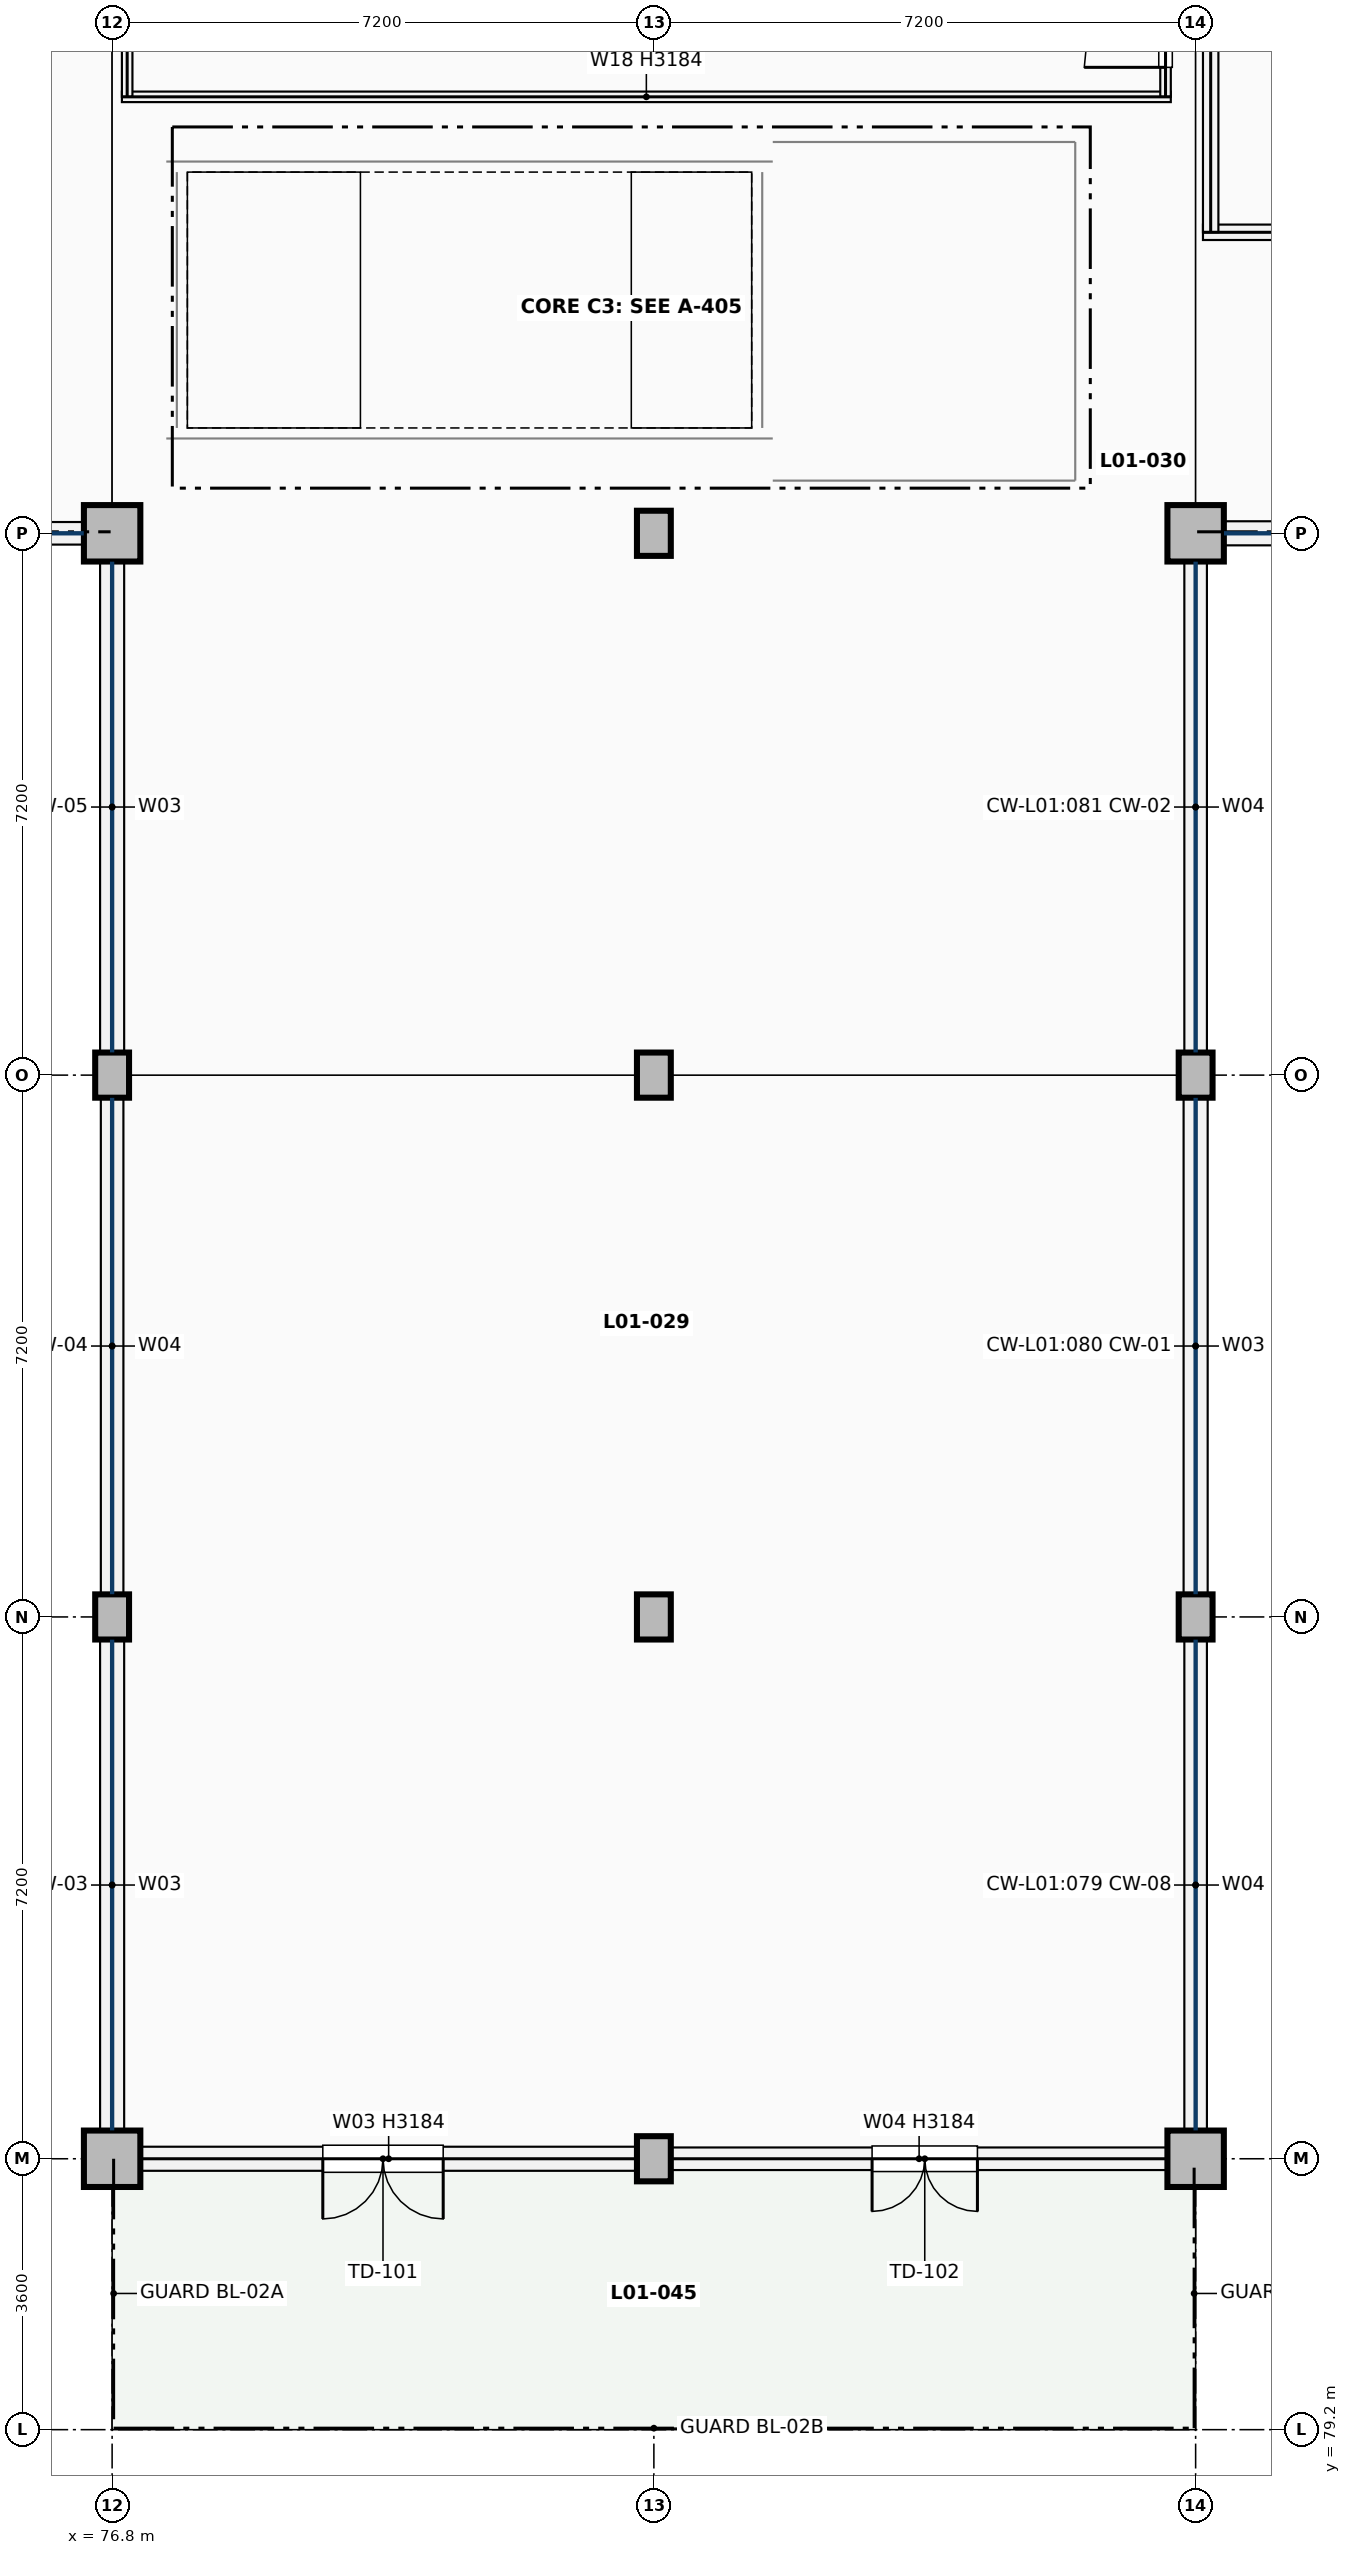
"""IFC4 building model, lengths in metres.
Left out: names, types, materials, properties, quantities, classifications, styles, units other than length and angle.
Written with IfcOpenShell. Run it as: python <this file> out.ifc"""

import sys

from ifc_helpers import new_model, si_unit, direction, frame, frame_2d, origin, origin_2d, place, context, subcontext, project, spatial, rectangle, extrude, element, fill, save


model = new_model("IFC4")
c1 = context("Model", 3, precision=1e-05, world=origin(), true_north=direction((0.0, 1.0)))
c2 = subcontext(c1, "Body", "Model", "MODEL_VIEW")
j1 = project(units=[si_unit("LENGTHUNIT", "METRE"), si_unit("PLANEANGLEUNIT", "RADIAN")], contexts=[c1])
p1 = place(None, origin())
s1 = spatial("IfcSite", under=j1, at=p1, CompositionType="ELEMENT")
p2 = place(p1, origin())
s2 = spatial("IfcBuilding", under=s1, at=p2, CompositionType="ELEMENT")
p3 = place(p2, frame((0.0, 0.0, 5.1)))
s3 = spatial("IfcBuildingStorey", under=s2, at=p3, CompositionType="ELEMENT", Elevation=5.1)
p4 = place(p3, frame((76.8, 82.8, 0.0), z_axis=(0.0, 0.0, 1.0), x_axis=(1.0, 0.0, 0.0)))
e1 = element("IfcColumn", 1, at=p4, inside=s3, PredefinedType="COLUMN", context=c2, shape_type="SweptSolid", body=[
    extrude(rectangle(XDim=0.75, YDim=0.75, at=origin_2d()), origin(), (0.0, 0.0, 1.0), 4.42),
])
for number, where, z_axis, x_axis in (
    (2, (76.8, 90.0, 0.0), (0.0, 0.0, 1.0), (1.0, 0.0, 0.0)),
    (3, (76.8, 97.2, 0.0), (0.0, 0.0, 1.0), (1.0, 0.0, 0.0)),
):
    element("IfcColumn", number, at=place(p3, frame(where, z_axis=z_axis, x_axis=x_axis)), inside=s3, PredefinedType="COLUMN", context=c2, shape_type="SweptSolid", body=[
        extrude(rectangle(XDim=0.45, YDim=0.6, at=origin_2d()), origin(), (0.0, 0.0, 1.0), 4.42),
    ])
p5 = place(p3, frame((76.8, 104.4, 0.0), z_axis=(0.0, 0.0, 1.0), x_axis=(1.0, 0.0, 0.0)))
e4 = element("IfcColumn", 4, at=p5, inside=s3, PredefinedType="COLUMN", context=c2, shape_type="SweptSolid", body=[
    extrude(rectangle(XDim=0.75, YDim=0.75, at=origin_2d()), origin(), (0.0, 0.0, 1.0), 4.42),
])
for number, where, z_axis, x_axis in (
    (5, (84.0, 82.8, 0.0), (0.0, 0.0, 1.0), (1.0, 0.0, 0.0)),
    (6, (84.0, 90.0, 0.0), (0.0, 0.0, 1.0), (1.0, 0.0, 0.0)),
    (7, (84.0, 97.2, 0.0), (0.0, 0.0, 1.0), (1.0, 0.0, 0.0)),
    (8, (84.0, 104.4, 0.0), (0.0, 0.0, 1.0), (1.0, 0.0, 0.0)),
):
    element("IfcColumn", number, at=place(p3, frame(where, z_axis=z_axis, x_axis=x_axis)), inside=s3, PredefinedType="COLUMN", context=c2, shape_type="SweptSolid", body=[
        extrude(rectangle(XDim=0.45, YDim=0.6, at=origin_2d()), origin(), (0.0, 0.0, 1.0), 4.42),
    ])
p6 = place(p3, frame((91.2, 82.8, 0.0), z_axis=(0.0, 0.0, 1.0), x_axis=(1.0, 0.0, 0.0)))
e9 = element("IfcColumn", 9, at=p6, inside=s3, PredefinedType="COLUMN", context=c2, shape_type="SweptSolid", body=[
    extrude(rectangle(XDim=0.75, YDim=0.75, at=origin_2d()), origin(), (0.0, 0.0, 1.0), 4.42),
])
for number, where, z_axis, x_axis in (
    (10, (91.2, 90.0, 0.0), (0.0, 0.0, 1.0), (1.0, 0.0, 0.0)),
    (11, (91.2, 97.2, 0.0), (0.0, 0.0, 1.0), (1.0, 0.0, 0.0)),
):
    element("IfcColumn", number, at=place(p3, frame(where, z_axis=z_axis, x_axis=x_axis)), inside=s3, PredefinedType="COLUMN", context=c2, shape_type="SweptSolid", body=[
        extrude(rectangle(XDim=0.45, YDim=0.6, at=origin_2d()), origin(), (0.0, 0.0, 1.0), 4.42),
    ])
p7 = place(p3, frame((91.2, 104.4, 0.0), z_axis=(0.0, 0.0, 1.0), x_axis=(1.0, 0.0, 0.0)))
e12 = element("IfcColumn", 12, at=p7, inside=s3, PredefinedType="COLUMN", context=c2, shape_type="SweptSolid", body=[
    extrude(rectangle(XDim=0.75, YDim=0.75, at=origin_2d()), origin(), (0.0, 0.0, 1.0), 4.42),
])
p8 = place(p3, frame((91.577, 104.4, 0.0), z_axis=(0.0, 0.0, 1.0), x_axis=(1.0, 0.0, 0.0)))
e13 = element("IfcWall", 13, at=p8, inside=s3, PredefinedType="SOLIDWALL", context=c2, shape_type="SweptSolid", body=[
    extrude(rectangle(XDim=6.446, YDim=0.32, at=frame_2d((3.223, 0.0))), origin(), (0.0, 0.0, 1.0), 0.85),
])
p9 = place(p3, frame((91.2, 83.177, 0.0), z_axis=(0.0, 0.0, 1.0), x_axis=(0.0, 1.0, 0.0)))
e14 = element("IfcWall", 14, at=p9, inside=s3, PredefinedType="SOLIDWALL", context=c2, shape_type="SweptSolid", body=[
    extrude(rectangle(XDim=6.521, YDim=0.3, at=frame_2d((3.26, 0.0))), origin(), (0.0, 0.0, 1.0), 0.85),
])
p10 = place(p3, frame((91.2, 90.302, 0.0), z_axis=(0.0, 0.0, 1.0), x_axis=(0.0, 1.0, 0.0)))
e15 = element("IfcWall", 15, at=p10, inside=s3, PredefinedType="SOLIDWALL", context=c2, shape_type="SweptSolid", body=[
    extrude(rectangle(XDim=6.596, YDim=0.32, at=frame_2d((3.298, 0.0))), origin(), (0.0, 0.0, 1.0), 0.85),
])
p11 = place(p3, frame((91.2, 97.502, 0.0), z_axis=(0.0, 0.0, 1.0), x_axis=(0.0, 1.0, 0.0)))
e16 = element("IfcWall", 16, at=p11, inside=s3, PredefinedType="SOLIDWALL", context=c2, shape_type="SweptSolid", body=[
    extrude(rectangle(XDim=6.521, YDim=0.3, at=frame_2d((3.26, 0.0))), origin(), (0.0, 0.0, 1.0), 0.85),
])
p12 = place(p3, frame((77.177, 82.8, 0.0), z_axis=(0.0, 0.0, 1.0), x_axis=(1.0, 0.0, 0.0)))
e17 = element("IfcWall", 17, at=p12, inside=s3, PredefinedType="SOLIDWALL", context=c2, shape_type="SweptSolid", body=[
    extrude(rectangle(XDim=6.596, YDim=0.32, at=frame_2d((3.298, 0.0))), origin(), (0.0, 0.0, 1.0), 3.184),
])
p13 = place(p12, frame((2.423, 0.0, 0.0)))
e18 = element("IfcOpeningElement", 18, at=p13, cuts=e17, PredefinedType="OPENING", context=c2, shape_type="SweptSolid", body=[
    extrude(rectangle(XDim=1.6, YDim=2.2, at=frame_2d((0.8, 1.1))), frame((0.0, 0.17, 0.0), z_axis=(0.0, -1.0, 0.0), x_axis=(1.0, 0.0, 0.0)), (0.0, 0.0, 1.0), 0.34),
])
p14 = place(p3, frame((84.227, 82.8, 0.0), z_axis=(0.0, 0.0, 1.0), x_axis=(1.0, 0.0, 0.0)))
e19 = element("IfcWall", 19, at=p14, inside=s3, PredefinedType="SOLIDWALL", context=c2, shape_type="SweptSolid", body=[
    extrude(rectangle(XDim=6.596, YDim=0.3, at=frame_2d((3.298, 0.0))), origin(), (0.0, 0.0, 1.0), 3.184),
])
p15 = place(p14, frame((2.673, 0.0, 0.0)))
e20 = element("IfcOpeningElement", 20, at=p15, cuts=e19, PredefinedType="OPENING", context=c2, shape_type="SweptSolid", body=[
    extrude(rectangle(XDim=1.4, YDim=2.2, at=frame_2d((0.7, 1.1))), frame((0.0, 0.16, 0.0), z_axis=(0.0, -1.0, 0.0), x_axis=(1.0, 0.0, 0.0)), (0.0, 0.0, 1.0), 0.32),
])
p16 = place(p3, frame((76.8, 83.177, 0.0), z_axis=(0.0, 0.0, 1.0), x_axis=(0.0, 1.0, 0.0)))
e21 = element("IfcWall", 21, at=p16, inside=s3, PredefinedType="SOLIDWALL", context=c2, shape_type="SweptSolid", body=[
    extrude(rectangle(XDim=6.521, YDim=0.32, at=frame_2d((3.26, 0.0))), origin(), (0.0, 0.0, 1.0), 0.85),
])
p17 = place(p3, frame((76.8, 90.302, 0.0), z_axis=(0.0, 0.0, 1.0), x_axis=(0.0, 1.0, 0.0)))
e22 = element("IfcWall", 22, at=p17, inside=s3, PredefinedType="SOLIDWALL", context=c2, shape_type="SweptSolid", body=[
    extrude(rectangle(XDim=6.596, YDim=0.3, at=frame_2d((3.298, 0.0))), origin(), (0.0, 0.0, 1.0), 0.85),
])
p18 = place(p3, frame((76.8, 97.502, 0.0), z_axis=(0.0, 0.0, 1.0), x_axis=(0.0, 1.0, 0.0)))
e23 = element("IfcWall", 23, at=p18, inside=s3, PredefinedType="SOLIDWALL", context=c2, shape_type="SweptSolid", body=[
    extrude(rectangle(XDim=6.521, YDim=0.32, at=frame_2d((3.26, 0.0))), origin(), (0.0, 0.0, 1.0), 0.85),
])
p19 = place(p3, frame((69.977, 104.4, 0.0), z_axis=(0.0, 0.0, 1.0), x_axis=(1.0, 0.0, 0.0)))
e24 = element("IfcWall", 24, at=p19, inside=s3, PredefinedType="SOLIDWALL", context=c2, shape_type="SweptSolid", body=[
    extrude(rectangle(XDim=6.446, YDim=0.3, at=frame_2d((3.223, 0.0))), origin(), (0.0, 0.0, 1.0), 0.85),
])
p20 = place(p3, frame((77.66, 105.8, 0.0), z_axis=(0.0, 0.0, 1.0), x_axis=(0.0, 1.0, 0.0)))
e25 = element("IfcWall", 25, at=p20, inside=s3, PredefinedType="SHEAR", context=c2, shape_type="SweptSolid", body=[
    extrude(rectangle(XDim=3.4, YDim=0.28, at=frame_2d((1.7, 0.0))), origin(), (0.0, 0.0, 1.0), 4.42),
])
for number, where, z_axis, x_axis in (
    (26, (77.52, 105.66, 0.0), (0.0, 0.0, 1.0), (1.0, 0.0, 0.0)),
    (27, (77.52, 109.34, 0.0), (0.0, 0.0, 1.0), (1.0, 0.0, 0.0)),
):
    element("IfcWall", number, at=place(p3, frame(where, z_axis=z_axis, x_axis=x_axis)), inside=s3, PredefinedType="SHEAR", context=c2, shape_type="SweptSolid", body=[
        extrude(rectangle(XDim=8.06, YDim=0.28, at=frame_2d((4.03, 0.0))), origin(), (0.0, 0.0, 1.0), 4.42),
    ])
p21 = place(p3, frame((85.44, 105.8, 0.0), z_axis=(0.0, 0.0, 1.0), x_axis=(0.0, 1.0, 0.0)))
e28 = element("IfcWall", 28, at=p21, inside=s3, PredefinedType="SHEAR", context=c2, shape_type="SweptSolid", body=[
    extrude(rectangle(XDim=3.4, YDim=0.28, at=frame_2d((1.7, 0.0))), origin(), (0.0, 0.0, 1.0), 4.42),
])
p22 = place(p21, frame((1.1, 0.0, 0.0)))
e29 = element("IfcOpeningElement", 29, at=p22, cuts=e28, PredefinedType="OPENING", context=c2, shape_type="SweptSolid", body=[
    extrude(rectangle(XDim=1.2, YDim=2.2, at=frame_2d((0.6, 1.1))), frame((0.0, 0.15, 0.0), z_axis=(0.0, -1.0, 0.0), x_axis=(1.0, 0.0, 0.0)), (0.0, 0.0, 1.0), 0.3),
])
p23 = place(p3, frame((89.6, 105.1, 0.0), z_axis=(0.0, 0.0, 1.0), x_axis=(0.0, 1.0, 0.0)))
e30 = element("IfcWall", 30, at=p23, inside=s3, PredefinedType="PARTITIONING", context=c2, shape_type="SweptSolid", body=[
    extrude(rectangle(XDim=4.5, YDim=0.2, at=frame_2d((2.25, 0.0))), origin(), (0.0, 0.0, 1.0), 3.694),
])
p24 = place(p23, frame((1.525, 0.0, 0.0)))
e31 = element("IfcOpeningElement", 31, at=p24, cuts=e30, PredefinedType="OPENING", context=c2, shape_type="SweptSolid", body=[
    extrude(rectangle(XDim=1.45, YDim=2.2, at=frame_2d((0.725, 1.1))), frame((0.0, 0.11, 0.0), z_axis=(0.0, -1.0, 0.0), x_axis=(1.0, 0.0, 0.0)), (0.0, 0.0, 1.0), 0.22),
])
for number, where, z_axis, x_axis in (
    (32, (85.58, 105.1, 0.0), (0.0, 0.0, 1.0), (1.0, 0.0, 0.0)),
    (33, (85.58, 109.6, 0.0), (0.0, 0.0, 1.0), (1.0, 0.0, 0.0)),
):
    element("IfcWall", number, at=place(p3, frame(where, z_axis=z_axis, x_axis=x_axis)), inside=s3, PredefinedType="PARTITIONING", context=c2, shape_type="SweptSolid", body=[
        extrude(rectangle(XDim=4.02, YDim=0.2, at=frame_2d((2.01, 0.0))), origin(), (0.0, 0.0, 1.0), 3.694),
    ])
p25 = place(p3, frame((76.93, 110.2, 0.0), z_axis=(0.0, 0.0, 1.0), x_axis=(1.0, 0.0, 0.0)))
e34 = element("IfcWall", 34, at=p25, inside=s3, PredefinedType="PARTITIONING", context=c2, shape_type="SweptSolid", body=[
    extrude(rectangle(XDim=13.94, YDim=0.14, at=frame_2d((6.97, 0.0))), origin(), (0.0, 0.0, 1.0), 3.184),
])
p26 = place(p3, frame((77.0, 110.2, 0.0), z_axis=(0.0, 0.0, 1.0), x_axis=(0.0, 1.0, 0.0)))
e35 = element("IfcWall", 35, at=p26, inside=s3, PredefinedType="PARTITIONING", context=c2, shape_type="SweptSolid", body=[
    extrude(rectangle(XDim=3.4, YDim=0.14, at=frame_2d((1.7, 0.0))), origin(), (0.0, 0.0, 1.0), 3.184),
])
p27 = place(p3, frame((90.8, 110.2, 0.0), z_axis=(0.0, 0.0, 1.0), x_axis=(0.0, 1.0, 0.0)))
e36 = element("IfcWall", 36, at=p27, inside=s3, PredefinedType="PARTITIONING", context=c2, shape_type="SweptSolid", body=[
    extrude(rectangle(XDim=3.4, YDim=0.14, at=frame_2d((1.7, 0.0))), origin(), (0.0, 0.0, 1.0), 3.694),
])
p28 = place(p27, frame((0.392, 0.0, 0.0)))
e37 = element("IfcOpeningElement", 37, at=p28, cuts=e36, PredefinedType="OPENING", context=c2, shape_type="SweptSolid", body=[
    extrude(rectangle(XDim=1.08, YDim=2.16, at=frame_2d((0.54, 1.08))), frame((0.0, 0.08, 0.0), z_axis=(0.0, -1.0, 0.0), x_axis=(1.0, 0.0, 0.0)), (0.0, 0.0, 1.0), 0.16),
])
p29 = place(p3, frame((91.298, 108.4, 0.0), z_axis=(0.0, 0.0, 1.0), x_axis=(1.0, 0.0, 0.0)))
e38 = element("IfcWall", 38, at=p29, inside=s3, PredefinedType="PARTITIONING", context=c2, shape_type="SweptSolid", body=[
    extrude(rectangle(XDim=30.805, YDim=0.205, at=frame_2d((15.402, 0.0))), origin(), (0.0, 0.0, 1.0), 3.184),
])
p30 = place(p29, frame((22.165, 0.0, 0.0)))
e39 = element("IfcOpeningElement", 39, at=p30, cuts=e38, PredefinedType="OPENING", context=c2, shape_type="SweptSolid", body=[
    extrude(rectangle(XDim=1.05, YDim=2.15, at=frame_2d((0.525, 1.075))), frame((0.0, 0.113, 0.0), z_axis=(0.0, -1.0, 0.0), x_axis=(1.0, 0.0, 0.0)), (0.0, 0.0, 1.0), 0.225),
])
p31 = place(p3, frame((91.4, 108.4, 0.0), z_axis=(0.0, 0.0, 1.0), x_axis=(0.0, 1.0, 0.0)))
e40 = element("IfcWall", 40, at=p31, inside=s3, PredefinedType="PARTITIONING", context=c2, shape_type="SweptSolid", body=[
    extrude(rectangle(XDim=5.2, YDim=0.205, at=frame_2d((2.6, 0.0))), origin(), (0.0, 0.0, 1.0), 3.184),
])
p32 = place(p13, frame((1.6, 0.0, 0.0), z_axis=(0.0, 0.0, 1.0), x_axis=(-1.0, 0.0, 0.0)))
e41 = element("IfcDoor", 41, at=p32, inside=s3, OperationType="DOUBLE_DOOR_SINGLE_SWING", PredefinedType="DOOR", context=c2, shape_type="SweptSolid", body=[
    extrude(rectangle(XDim=1.6, YDim=2.2, at=frame_2d((0.8, 1.1))), frame((0.0, 0.025, 0.0), z_axis=(0.0, -1.0, 0.0), x_axis=(1.0, 0.0, 0.0)), (0.0, 0.0, 1.0), 0.05),
])
fill(e18, e41)
p33 = place(p15, frame((1.4, 0.0, 0.0), z_axis=(0.0, 0.0, 1.0), x_axis=(-1.0, 0.0, 0.0)))
e42 = element("IfcDoor", 42, at=p33, inside=s3, OperationType="DOUBLE_DOOR_SINGLE_SWING", PredefinedType="DOOR", context=c2, shape_type="SweptSolid", body=[
    extrude(rectangle(XDim=1.4, YDim=2.2, at=frame_2d((0.7, 1.1))), frame((0.0, 0.025, 0.0), z_axis=(0.0, -1.0, 0.0), x_axis=(1.0, 0.0, 0.0)), (0.0, 0.0, 1.0), 0.05),
])
fill(e20, e42)
p34 = place(p22, origin())
e43 = element("IfcDoor", 43, at=p34, inside=s3, OperationType="SINGLE_SWING_LEFT", PredefinedType="DOOR", context=c2, shape_type="SweptSolid", body=[
    extrude(rectangle(XDim=1.2, YDim=2.2, at=frame_2d((0.6, 1.1))), frame((0.0, 0.025, 0.0), z_axis=(0.0, -1.0, 0.0), x_axis=(1.0, 0.0, 0.0)), (0.0, 0.0, 1.0), 0.05),
])
fill(e29, e43)
p35 = place(p24, frame((1.45, 0.0, 0.0), z_axis=(0.0, 0.0, 1.0), x_axis=(-1.0, 0.0, 0.0)))
e44 = element("IfcDoor", 44, at=p35, inside=s3, OperationType="DOUBLE_DOOR_SINGLE_SWING", PredefinedType="DOOR", context=c2, shape_type="SweptSolid", body=[
    extrude(rectangle(XDim=1.45, YDim=2.2, at=frame_2d((0.725, 1.1))), frame((0.0, 0.025, 0.0), z_axis=(0.0, -1.0, 0.0), x_axis=(1.0, 0.0, 0.0)), (0.0, 0.0, 1.0), 0.05),
])
fill(e31, e44)
p36 = place(p28, origin())
e45 = element("IfcDoor", 45, at=p36, inside=s3, OperationType="SINGLE_SWING_LEFT", PredefinedType="DOOR", context=c2, shape_type="SweptSolid", body=[
    extrude(rectangle(XDim=1.08, YDim=2.16, at=frame_2d((0.54, 1.08))), frame((0.0, 0.025, 0.0), z_axis=(0.0, -1.0, 0.0), x_axis=(1.0, 0.0, 0.0)), (0.0, 0.0, 1.0), 0.05),
])
fill(e37, e45)
save(model, sys.argv[1])
